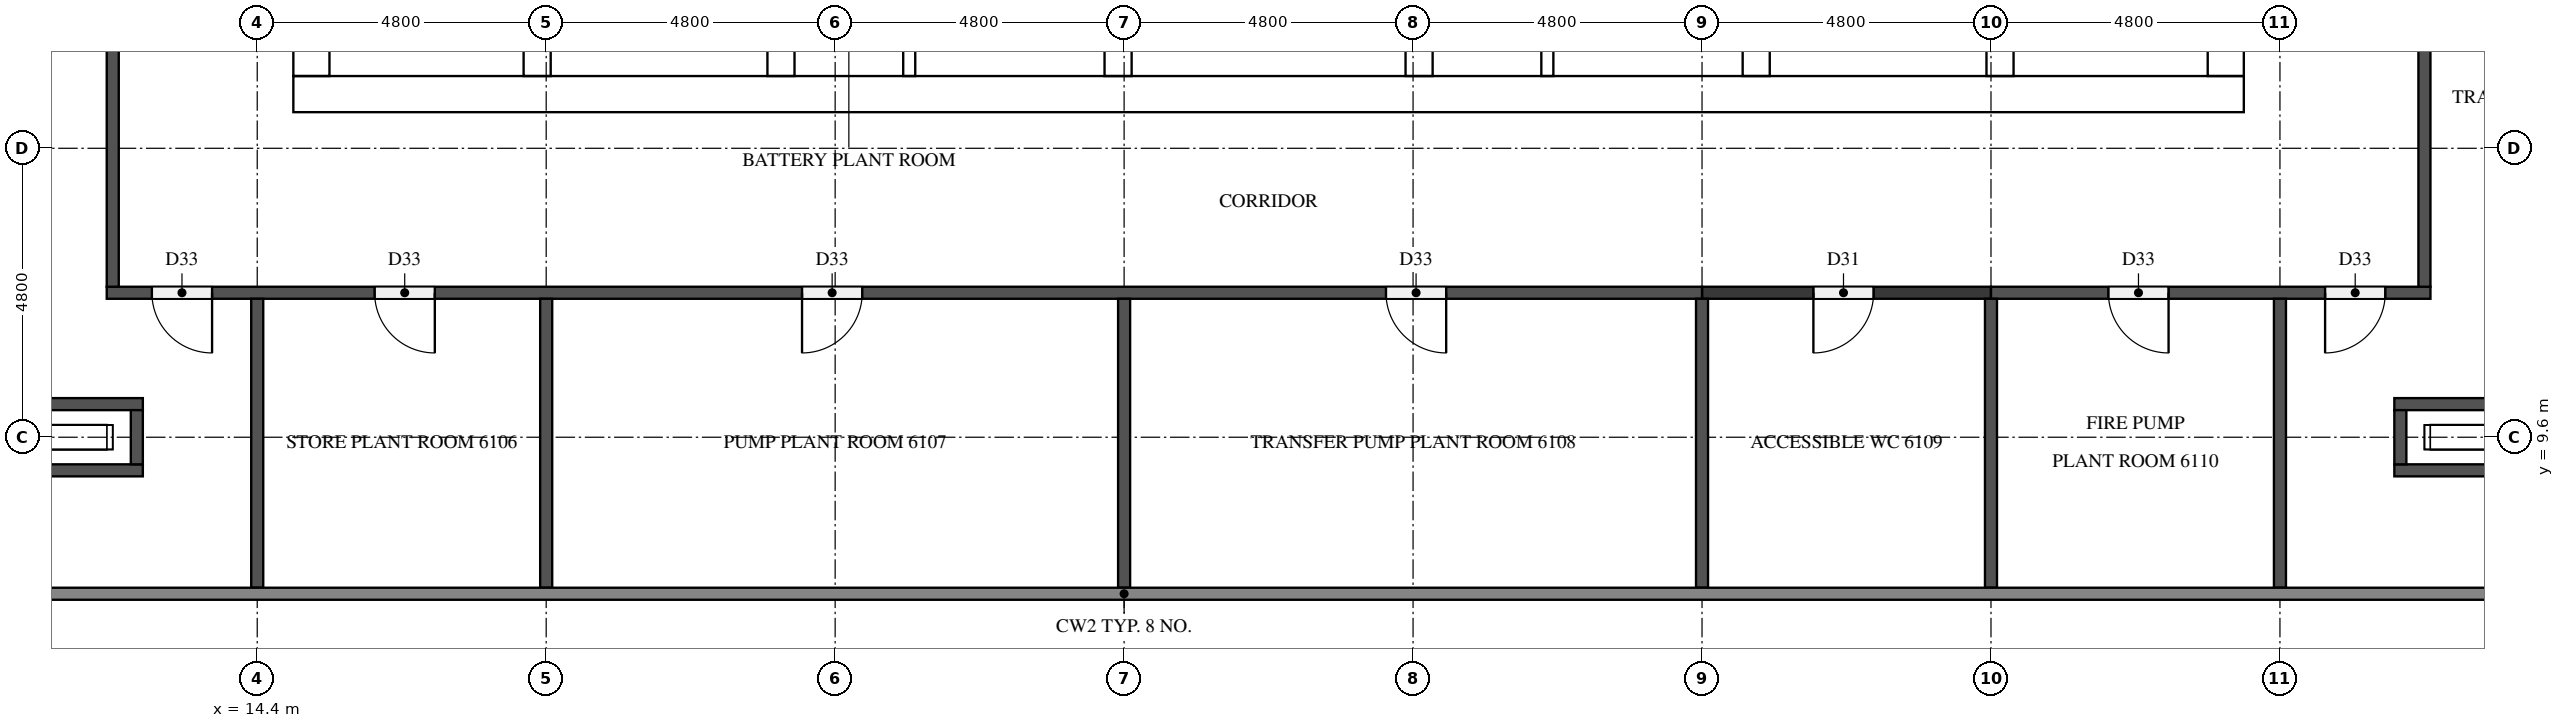
"""IFC4 building model, lengths in metres.
Left out: names, types, materials, properties, quantities, classifications, styles, units other than length and angle.
Written with IfcOpenShell. Run it as: python <this file> out.ifc"""

import sys

from ifc_helpers import new_model, si_unit, direction, frame, frame_2d, origin, place, context, subcontext, project, spatial, rectangle, extrude, element, fill, save


model = new_model("IFC4")
c1 = context("Model", 3, precision=1e-05, world=origin(), true_north=direction((0.0, 1.0)))
c2 = subcontext(c1, "Body", "Model", "MODEL_VIEW")
j1 = project(units=[si_unit("LENGTHUNIT", "METRE"), si_unit("PLANEANGLEUNIT", "RADIAN")], contexts=[c1])
p1 = place(None, origin())
s1 = spatial("IfcSite", under=j1, at=p1, CompositionType="ELEMENT")
p2 = place(p1, origin())
s2 = spatial("IfcBuilding", under=s1, at=p2, CompositionType="ELEMENT")
p3 = place(p2, frame((0.0, 0.0, 233.3)))
s3 = spatial("IfcBuildingStorey", under=s2, at=p3, CompositionType="ELEMENT", Elevation=233.3)
p4 = place(p3, frame((15.0, 15.3, 0.0), z_axis=(0.0, 0.0, 1.0), x_axis=(1.0, 0.0, 0.0)))
e1 = element("IfcWall", 1, at=p4, inside=s3, PredefinedType="SHEAR", context=c2, shape_type="SweptSolid", body=[
    extrude(rectangle(XDim=32.4, YDim=0.6, at=frame_2d((16.2, 0.0))), origin(), (0.0, 0.0, 1.0), 5.1),
])
p5 = place(p4, frame((15.3, 0.0, 0.0)))
e2 = element("IfcOpeningElement", 2, at=p5, cuts=e1, PredefinedType="OPENING", context=c2, shape_type="SweptSolid", body=[
    extrude(rectangle(XDim=1.8, YDim=2.1, at=frame_2d((0.9, 1.05))), frame((0.0, 0.31, 0.0), z_axis=(0.0, -1.0, 0.0), x_axis=(1.0, 0.0, 0.0)), (0.0, 0.0, 1.0), 0.62),
])
p6 = place(p3, frame((15.3, 15.6, 0.0), z_axis=(0.0, 0.0, 1.0), x_axis=(0.0, 1.0, 0.0)))
e3 = element("IfcWall", 3, at=p6, inside=s3, PredefinedType="SHEAR", context=c2, shape_type="SweptSolid", body=[
    extrude(rectangle(XDim=21.6, YDim=0.6, at=frame_2d((10.8, 0.0))), origin(), (0.0, 0.0, 1.0), 5.1),
])
p7 = place(p6, frame((5.16, 0.0, 0.0)))
e4 = element("IfcOpeningElement", 4, at=p7, cuts=e3, PredefinedType="OPENING", context=c2, shape_type="SweptSolid", body=[
    extrude(rectangle(XDim=1.2, YDim=2.1, at=frame_2d((0.6, 1.05))), frame((0.0, 0.31, 0.0), z_axis=(0.0, -1.0, 0.0), x_axis=(1.0, 0.0, 0.0)), (0.0, 0.0, 1.0), 0.62),
])
p8 = place(p3, frame((47.1, 15.6, 0.0), z_axis=(0.0, 0.0, 1.0), x_axis=(0.0, 1.0, 0.0)))
e5 = element("IfcWall", 5, at=p8, inside=s3, PredefinedType="SHEAR", context=c2, shape_type="SweptSolid", body=[
    extrude(rectangle(XDim=21.6, YDim=0.6, at=frame_2d((10.8, 0.0))), origin(), (0.0, 0.0, 1.0), 5.1),
])
p9 = place(p8, frame((10.5, 0.0, 0.0)))
e6 = element("IfcOpeningElement", 6, at=p9, cuts=e5, PredefinedType="OPENING", context=c2, shape_type="SweptSolid", body=[
    extrude(rectangle(XDim=1.2, YDim=2.1, at=frame_2d((0.6, 1.05))), frame((0.0, 0.31, 0.0), z_axis=(0.0, -1.0, 0.0), x_axis=(1.0, 0.0, 0.0)), (0.0, 0.0, 1.0), 0.62),
])
p10 = place(p3, frame((19.05, 15.6, 0.0), z_axis=(0.0, 0.0, 1.0), x_axis=(0.0, 1.0, 0.0)))
e7 = element("IfcWall", 7, at=p10, inside=s3, PredefinedType="SHEAR", context=c2, shape_type="SweptSolid", body=[
    extrude(rectangle(XDim=15.425, YDim=0.45, at=frame_2d((7.712, 0.0))), origin(), (0.0, 0.0, 1.0), 5.1),
])
p11 = place(p10, frame((9.85, 0.0, 0.0)))
e8 = element("IfcOpeningElement", 8, at=p11, cuts=e7, PredefinedType="OPENING", context=c2, shape_type="SweptSolid", body=[
    extrude(rectangle(XDim=1.1, YDim=2.1, at=frame_2d((0.55, 1.05))), frame((0.0, 0.235, 0.0), z_axis=(0.0, -1.0, 0.0), x_axis=(1.0, 0.0, 0.0)), (0.0, 0.0, 1.0), 0.47),
])
p12 = place(p10, frame((13.35, 0.0, 0.0)))
e9 = element("IfcOpeningElement", 9, at=p12, cuts=e7, PredefinedType="OPENING", context=c2, shape_type="SweptSolid", body=[
    extrude(rectangle(XDim=1.1, YDim=2.1, at=frame_2d((0.55, 1.05))), frame((0.0, 0.235, 0.0), z_axis=(0.0, -1.0, 0.0), x_axis=(1.0, 0.0, 0.0)), (0.0, 0.0, 1.0), 0.47),
])
p13 = place(p10, frame((0.6, 0.0, 0.0)))
e10 = element("IfcOpeningElement", 10, at=p13, cuts=e7, PredefinedType="OPENING", context=c2, shape_type="SweptSolid", body=[
    extrude(rectangle(XDim=1.2, YDim=2.1, at=frame_2d((0.6, 1.05))), frame((0.0, 0.235, 0.0), z_axis=(0.0, -1.0, 0.0), x_axis=(1.0, 0.0, 0.0)), (0.0, 0.0, 1.0), 0.47),
])
p14 = place(p3, frame((23.1, 15.6, 0.0), z_axis=(0.0, 0.0, 1.0), x_axis=(0.0, 1.0, 0.0)))
e11 = element("IfcWall", 11, at=p14, inside=s3, PredefinedType="SHEAR", context=c2, shape_type="SweptSolid", body=[
    extrude(rectangle(XDim=21.6, YDim=0.45, at=frame_2d((10.8, 0.0))), origin(), (0.0, 0.0, 1.0), 5.1),
])
p15 = place(p3, frame((39.3, 15.6, 0.0), z_axis=(0.0, 0.0, 1.0), x_axis=(0.0, 1.0, 0.0)))
e12 = element("IfcWall", 12, at=p15, inside=s3, PredefinedType="SHEAR", context=c2, shape_type="SweptSolid", body=[
    extrude(rectangle(XDim=8.65, YDim=0.45, at=frame_2d((4.325, 0.0))), origin(), (0.0, 0.0, 1.0), 5.1),
])
p16 = place(p3, frame((43.35, 15.6, 0.0), z_axis=(0.0, 0.0, 1.0), x_axis=(0.0, 1.0, 0.0)))
e13 = element("IfcWall", 13, at=p16, inside=s3, PredefinedType="SHEAR", context=c2, shape_type="SweptSolid", body=[
    extrude(rectangle(XDim=8.65, YDim=0.45, at=frame_2d((4.325, 0.0))), origin(), (0.0, 0.0, 1.0), 5.1),
])
p17 = place(p16, frame((0.6, 0.0, 0.0)))
e14 = element("IfcOpeningElement", 14, at=p17, cuts=e13, PredefinedType="OPENING", context=c2, shape_type="SweptSolid", body=[
    extrude(rectangle(XDim=1.2, YDim=2.1, at=frame_2d((0.6, 1.05))), frame((0.0, 0.235, 0.0), z_axis=(0.0, -1.0, 0.0), x_axis=(1.0, 0.0, 0.0)), (0.0, 0.0, 1.0), 0.47),
])
for number, where, z_axis, x_axis in (
    (15, (28.7, 15.6, 0.0), (0.0, 0.0, 1.0), (0.0, 1.0, 0.0)),
    (16, (33.7, 15.6, 0.0), (0.0, 0.0, 1.0), (0.0, 1.0, 0.0)),
):
    element("IfcWall", number, at=place(p3, frame(where, z_axis=z_axis, x_axis=x_axis)), inside=s3, PredefinedType="SHEAR", context=c2, shape_type="SweptSolid", body=[
        extrude(rectangle(XDim=2.925, YDim=0.45, at=frame_2d((1.462, 0.0))), origin(), (0.0, 0.0, 1.0), 5.1),
    ])
for number, where, z_axis, x_axis in (
    (17, (25.23, 15.6, 0.0), (0.0, 0.0, 1.0), (0.0, 1.0, 0.0)),
    (18, (35.831, 15.6, 0.0), (0.0, 0.0, 1.0), (0.0, 1.0, 0.0)),
):
    element("IfcWall", number, at=place(p3, frame(where, z_axis=z_axis, x_axis=x_axis)), inside=s3, PredefinedType="PARTITIONING", context=c2, shape_type="SweptSolid", body=[
        extrude(rectangle(XDim=2.925, YDim=0.2, at=frame_2d((1.462, 0.0))), origin(), (0.0, 0.0, 1.0), 5.1),
    ])
p18 = place(p3, frame((2.45, 9.05, 0.0), z_axis=(0.0, 0.0, 1.0), x_axis=(1.0, 0.0, 0.0)))
e19 = element("IfcWall", 19, at=p18, inside=s3, PredefinedType="PARTITIONING", context=c2, shape_type="SweptSolid", body=[
    extrude(rectangle(XDim=10.05, YDim=0.2, at=frame_2d((5.025, 0.0))), origin(), (0.0, 0.0, 1.0), 5.1),
])
p19 = place(p3, frame((49.9, 9.05, 0.0), z_axis=(0.0, 0.0, 1.0), x_axis=(1.0, 0.0, 0.0)))
e20 = element("IfcWall", 20, at=p19, inside=s3, PredefinedType="PARTITIONING", context=c2, shape_type="SweptSolid", body=[
    extrude(rectangle(XDim=5.25, YDim=0.2, at=frame_2d((2.625, 0.0))), origin(), (0.0, 0.0, 1.0), 5.1),
])
p20 = place(p3, frame((2.3, 10.15, 0.0), z_axis=(0.0, 0.0, 1.0), x_axis=(1.0, 0.0, 0.0)))
e21 = element("IfcWall", 21, at=p20, inside=s3, PredefinedType="PARTITIONING", context=c2, shape_type="SweptSolid", body=[
    extrude(rectangle(XDim=10.2, YDim=0.2, at=frame_2d((5.1, 0.0))), origin(), (0.0, 0.0, 1.0), 5.1),
])
p21 = place(p3, frame((49.9, 10.15, 0.0), z_axis=(0.0, 0.0, 1.0), x_axis=(1.0, 0.0, 0.0)))
e22 = element("IfcWall", 22, at=p21, inside=s3, PredefinedType="PARTITIONING", context=c2, shape_type="SweptSolid", body=[
    extrude(rectangle(XDim=5.4, YDim=0.2, at=frame_2d((2.7, 0.0))), origin(), (0.0, 0.0, 1.0), 5.1),
])
p22 = place(p3, frame((43.2, 12.0, 0.0), z_axis=(0.0, 0.0, 1.0), x_axis=(-1.0, 0.0, 0.0)))
e23 = element("IfcWall", 23, at=p22, inside=s3, PredefinedType="PARTITIONING", context=c2, shape_type="SweptSolid", body=[
    extrude(rectangle(XDim=4.8, YDim=0.2, at=frame_2d((2.4, 0.0))), origin(), (0.0, 0.0, 1.0), 5.1),
])
p23 = place(p22, frame((1.95, 0.0, 0.0)))
e24 = element("IfcOpeningElement", 24, at=p23, cuts=e23, PredefinedType="OPENING", context=c2, shape_type="SweptSolid", body=[
    extrude(rectangle(XDim=1.0, YDim=2.1, at=frame_2d((0.5, 1.05))), frame((0.0, 0.11, 0.0), z_axis=(0.0, -1.0, 0.0), x_axis=(1.0, 0.0, 0.0)), (0.0, 0.0, 1.0), 0.22),
])
p24 = place(p3, frame((38.4, 12.0, 0.0), z_axis=(0.0, 0.0, 1.0), x_axis=(-1.0, 0.0, 0.0)))
e25 = element("IfcWall", 25, at=p24, inside=s3, PredefinedType="PARTITIONING", context=c2, shape_type="SweptSolid", body=[
    extrude(rectangle(XDim=26.5, YDim=0.2, at=frame_2d((13.25, 0.0))), origin(), (0.0, 0.0, 1.0), 5.1),
])
p25 = place(p24, frame((24.75, 0.0, 0.0)))
e26 = element("IfcOpeningElement", 26, at=p25, cuts=e25, PredefinedType="OPENING", context=c2, shape_type="SweptSolid", body=[
    extrude(rectangle(XDim=1.0, YDim=2.1, at=frame_2d((0.5, 1.05))), frame((0.0, 0.11, 0.0), z_axis=(0.0, -1.0, 0.0), x_axis=(1.0, 0.0, 0.0)), (0.0, 0.0, 1.0), 0.22),
])
p26 = place(p24, frame((21.05, 0.0, 0.0)))
e27 = element("IfcOpeningElement", 27, at=p26, cuts=e25, PredefinedType="OPENING", context=c2, shape_type="SweptSolid", body=[
    extrude(rectangle(XDim=1.0, YDim=2.1, at=frame_2d((0.5, 1.05))), frame((0.0, 0.11, 0.0), z_axis=(0.0, -1.0, 0.0), x_axis=(1.0, 0.0, 0.0)), (0.0, 0.0, 1.0), 0.22),
])
p27 = place(p24, frame((13.95, 0.0, 0.0)))
e28 = element("IfcOpeningElement", 28, at=p27, cuts=e25, PredefinedType="OPENING", context=c2, shape_type="SweptSolid", body=[
    extrude(rectangle(XDim=1.0, YDim=2.1, at=frame_2d((0.5, 1.05))), frame((0.0, 0.11, 0.0), z_axis=(0.0, -1.0, 0.0), x_axis=(1.0, 0.0, 0.0)), (0.0, 0.0, 1.0), 0.22),
])
p28 = place(p24, frame((4.25, 0.0, 0.0)))
e29 = element("IfcOpeningElement", 29, at=p28, cuts=e25, PredefinedType="OPENING", context=c2, shape_type="SweptSolid", body=[
    extrude(rectangle(XDim=1.0, YDim=2.1, at=frame_2d((0.5, 1.05))), frame((0.0, 0.11, 0.0), z_axis=(0.0, -1.0, 0.0), x_axis=(1.0, 0.0, 0.0)), (0.0, 0.0, 1.0), 0.22),
])
p29 = place(p3, frame((50.5, 12.0, 0.0), z_axis=(0.0, 0.0, 1.0), x_axis=(-1.0, 0.0, 0.0)))
e30 = element("IfcWall", 30, at=p29, inside=s3, PredefinedType="PARTITIONING", context=c2, shape_type="SweptSolid", body=[
    extrude(rectangle(XDim=7.3, YDim=0.2, at=frame_2d((3.65, 0.0))), origin(), (0.0, 0.0, 1.0), 5.1),
])
p30 = place(p29, frame((4.35, 0.0, 0.0)))
e31 = element("IfcOpeningElement", 31, at=p30, cuts=e30, PredefinedType="OPENING", context=c2, shape_type="SweptSolid", body=[
    extrude(rectangle(XDim=1.0, YDim=2.1, at=frame_2d((0.5, 1.05))), frame((0.0, 0.11, 0.0), z_axis=(0.0, -1.0, 0.0), x_axis=(1.0, 0.0, 0.0)), (0.0, 0.0, 1.0), 0.22),
])
p31 = place(p29, frame((0.75, 0.0, 0.0)))
e32 = element("IfcOpeningElement", 32, at=p31, cuts=e30, PredefinedType="OPENING", context=c2, shape_type="SweptSolid", body=[
    extrude(rectangle(XDim=1.0, YDim=2.1, at=frame_2d((0.5, 1.05))), frame((0.0, 0.11, 0.0), z_axis=(0.0, -1.0, 0.0), x_axis=(1.0, 0.0, 0.0)), (0.0, 0.0, 1.0), 0.22),
])
p32 = place(p3, frame((12.0, 12.1, 0.0), z_axis=(0.0, 0.0, 1.0), x_axis=(0.0, 1.0, 0.0)))
e33 = element("IfcWall", 33, at=p32, inside=s3, PredefinedType="PARTITIONING", context=c2, shape_type="SweptSolid", body=[
    extrude(rectangle(XDim=6.45, YDim=0.2, at=frame_2d((3.225, 0.0))), origin(), (0.0, 0.0, 1.0), 5.1),
])
p33 = place(p3, frame((12.4, 9.15, 0.0), z_axis=(0.0, 0.0, 1.0), x_axis=(0.0, 1.0, 0.0)))
e34 = element("IfcWall", 34, at=p33, inside=s3, PredefinedType="PARTITIONING", context=c2, shape_type="SweptSolid", body=[
    extrude(rectangle(XDim=0.9, YDim=0.2, at=frame_2d((0.45, 0.0))), origin(), (0.0, 0.0, 1.0), 5.1),
])
for number, where, z_axis, x_axis in (
    (35, (14.4, 7.1, 0.0), (0.0, 0.0, 1.0), (0.0, 1.0, 0.0)),
    (36, (19.2, 7.1, 0.0), (0.0, 0.0, 1.0), (0.0, 1.0, 0.0)),
    (37, (28.8, 7.1, 0.0), (0.0, 0.0, 1.0), (0.0, 1.0, 0.0)),
    (38, (38.4, 7.1, 0.0), (0.0, 0.0, 1.0), (0.0, 1.0, 0.0)),
    (39, (43.2, 7.1, 0.0), (0.0, 0.0, 1.0), (0.0, 1.0, 0.0)),
    (40, (48.0, 7.1, 0.0), (0.0, 0.0, 1.0), (0.0, 1.0, 0.0)),
):
    element("IfcWall", number, at=place(p3, frame(where, z_axis=z_axis, x_axis=x_axis)), inside=s3, PredefinedType="PARTITIONING", context=c2, shape_type="SweptSolid", body=[
        extrude(rectangle(XDim=4.8, YDim=0.2, at=frame_2d((2.4, 0.0))), origin(), (0.0, 0.0, 1.0), 5.1),
    ])
p34 = place(p3, frame((50.0, 9.15, 0.0), z_axis=(0.0, 0.0, 1.0), x_axis=(0.0, 1.0, 0.0)))
e41 = element("IfcWall", 41, at=p34, inside=s3, PredefinedType="PARTITIONING", context=c2, shape_type="SweptSolid", body=[
    extrude(rectangle(XDim=0.9, YDim=0.2, at=frame_2d((0.45, 0.0))), origin(), (0.0, 0.0, 1.0), 5.1),
])
p35 = place(p3, frame((50.4, 12.1, 0.0), z_axis=(0.0, 0.0, 1.0), x_axis=(0.0, 1.0, 0.0)))
e42 = element("IfcWall", 42, at=p35, inside=s3, PredefinedType="PARTITIONING", context=c2, shape_type="SweptSolid", body=[
    extrude(rectangle(XDim=6.45, YDim=0.2, at=frame_2d((3.225, 0.0))), origin(), (0.0, 0.0, 1.0), 5.1),
])
p36 = place(p5, frame((1.8, 0.0, 0.0), z_axis=(0.0, 0.0, 1.0), x_axis=(-1.0, 0.0, 0.0)))
e43 = element("IfcDoor", 43, at=p36, inside=s3, OperationType="DOUBLE_DOOR_SINGLE_SWING", PredefinedType="DOOR", context=c2, shape_type="SweptSolid", body=[
    extrude(rectangle(XDim=1.8, YDim=2.1, at=frame_2d((0.9, 1.05))), frame((0.0, 0.025, 0.0), z_axis=(0.0, -1.0, 0.0), x_axis=(1.0, 0.0, 0.0)), (0.0, 0.0, 1.0), 0.05),
])
fill(e2, e43)
p37 = place(p25, origin())
e44 = element("IfcDoor", 44, at=p37, inside=s3, OperationType="SINGLE_SWING_LEFT", PredefinedType="DOOR", context=c2, shape_type="SweptSolid", body=[
    extrude(rectangle(XDim=1.0, YDim=2.1, at=frame_2d((0.5, 1.05))), frame((0.0, 0.025, 0.0), z_axis=(0.0, -1.0, 0.0), x_axis=(1.0, 0.0, 0.0)), (0.0, 0.0, 1.0), 0.05),
])
fill(e26, e44)
p38 = place(p26, origin())
e45 = element("IfcDoor", 45, at=p38, inside=s3, OperationType="SINGLE_SWING_LEFT", PredefinedType="DOOR", context=c2, shape_type="SweptSolid", body=[
    extrude(rectangle(XDim=1.0, YDim=2.1, at=frame_2d((0.5, 1.05))), frame((0.0, 0.025, 0.0), z_axis=(0.0, -1.0, 0.0), x_axis=(1.0, 0.0, 0.0)), (0.0, 0.0, 1.0), 0.05),
])
fill(e27, e45)
p39 = place(p27, origin())
e46 = element("IfcDoor", 46, at=p39, inside=s3, OperationType="SINGLE_SWING_RIGHT", PredefinedType="DOOR", context=c2, shape_type="SweptSolid", body=[
    extrude(rectangle(XDim=1.0, YDim=2.1, at=frame_2d((0.5, 1.05))), frame((0.0, 0.025, 0.0), z_axis=(0.0, -1.0, 0.0), x_axis=(1.0, 0.0, 0.0)), (0.0, 0.0, 1.0), 0.05),
])
fill(e28, e46)
p40 = place(p28, origin())
e47 = element("IfcDoor", 47, at=p40, inside=s3, OperationType="SINGLE_SWING_LEFT", PredefinedType="DOOR", context=c2, shape_type="SweptSolid", body=[
    extrude(rectangle(XDim=1.0, YDim=2.1, at=frame_2d((0.5, 1.05))), frame((0.0, 0.025, 0.0), z_axis=(0.0, -1.0, 0.0), x_axis=(1.0, 0.0, 0.0)), (0.0, 0.0, 1.0), 0.05),
])
fill(e29, e47)
p41 = place(p23, origin())
e48 = element("IfcDoor", 48, at=p41, inside=s3, OperationType="SINGLE_SWING_RIGHT", PredefinedType="DOOR", context=c2, shape_type="SweptSolid", body=[
    extrude(rectangle(XDim=1.0, YDim=2.1, at=frame_2d((0.5, 1.05))), frame((0.0, 0.025, 0.0), z_axis=(0.0, -1.0, 0.0), x_axis=(1.0, 0.0, 0.0)), (0.0, 0.0, 1.0), 0.05),
])
fill(e24, e48)
p42 = place(p30, origin())
e49 = element("IfcDoor", 49, at=p42, inside=s3, OperationType="SINGLE_SWING_LEFT", PredefinedType="DOOR", context=c2, shape_type="SweptSolid", body=[
    extrude(rectangle(XDim=1.0, YDim=2.1, at=frame_2d((0.5, 1.05))), frame((0.0, 0.025, 0.0), z_axis=(0.0, -1.0, 0.0), x_axis=(1.0, 0.0, 0.0)), (0.0, 0.0, 1.0), 0.05),
])
fill(e31, e49)
p43 = place(p31, origin())
e50 = element("IfcDoor", 50, at=p43, inside=s3, OperationType="SINGLE_SWING_RIGHT", PredefinedType="DOOR", context=c2, shape_type="SweptSolid", body=[
    extrude(rectangle(XDim=1.0, YDim=2.1, at=frame_2d((0.5, 1.05))), frame((0.0, 0.025, 0.0), z_axis=(0.0, -1.0, 0.0), x_axis=(1.0, 0.0, 0.0)), (0.0, 0.0, 1.0), 0.05),
])
fill(e32, e50)
save(model, sys.argv[1])
